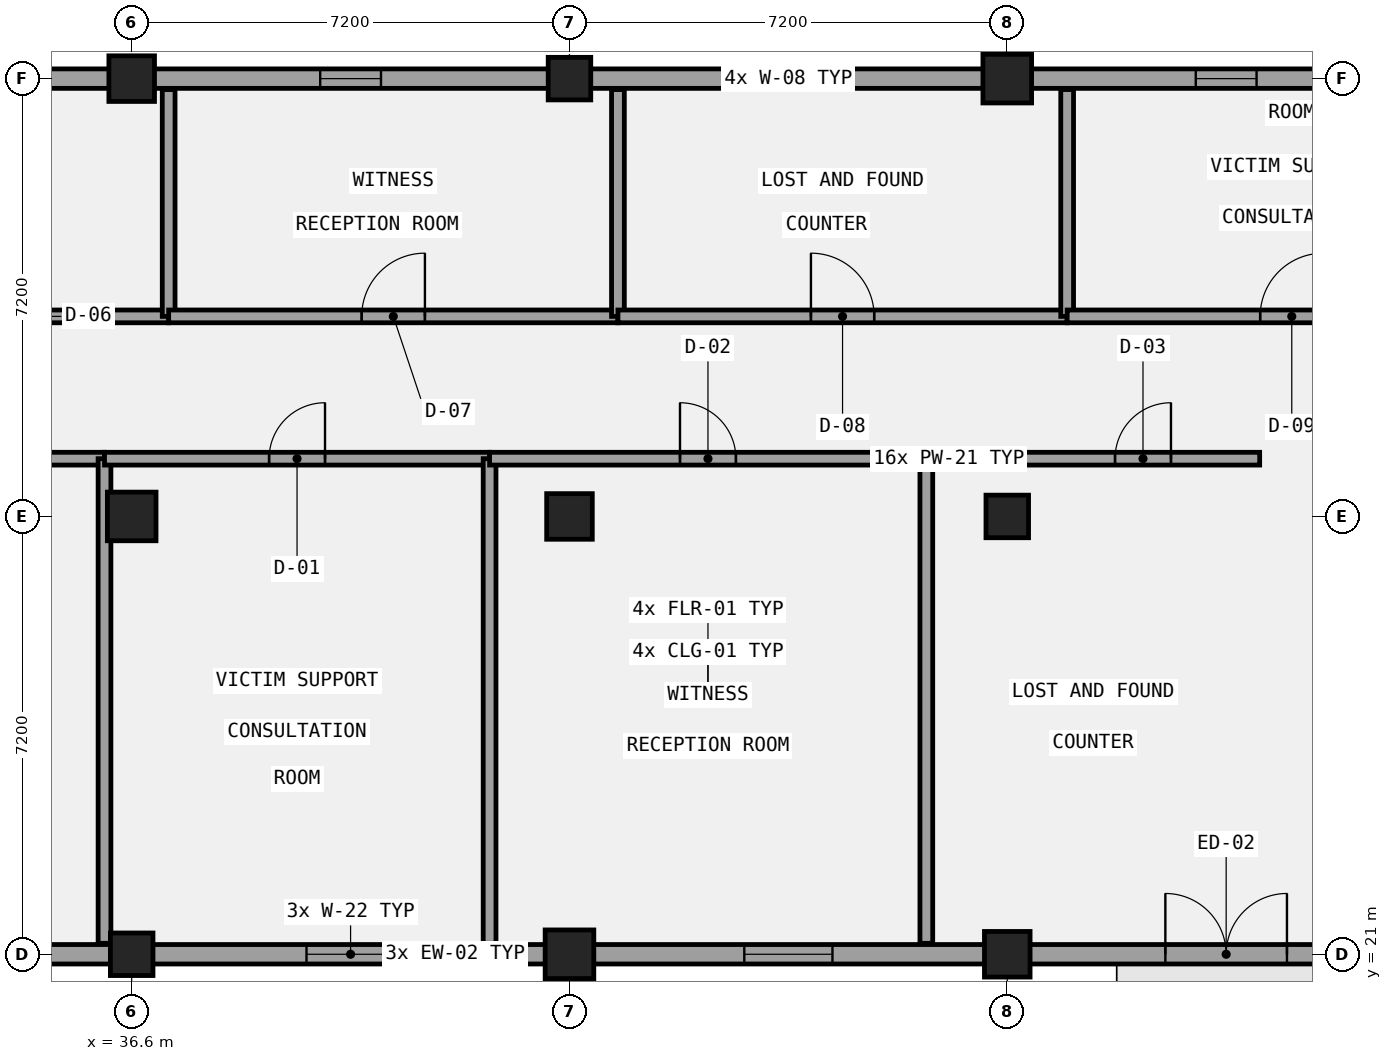
"""IFC4 building model, lengths in metres.
Left out: names, types, materials, properties, quantities, classifications, styles, units other than length and angle.
Written with IfcOpenShell. Run it as: python <this file> out.ifc"""

import sys

from ifc_helpers import new_model, si_unit, direction, frame, frame_2d, origin, origin_2d, place, context, subcontext, project, spatial, rectangle, extrude, element, fill, save


model = new_model("IFC4")
c1 = context("Model", 3, precision=1e-05, world=origin(), true_north=direction((0.0, 1.0)))
c2 = subcontext(c1, "Body", "Model", "MODEL_VIEW")
j1 = project(units=[si_unit("LENGTHUNIT", "METRE"), si_unit("PLANEANGLEUNIT", "RADIAN")], contexts=[c1])
p1 = place(None, origin())
s1 = spatial("IfcSite", under=j1, at=p1, CompositionType="ELEMENT")
p2 = place(p1, origin())
s2 = spatial("IfcBuilding", under=s1, at=p2, CompositionType="ELEMENT")
p3 = place(p2, origin())
s3 = spatial("IfcBuildingStorey", under=s2, at=p3, CompositionType="ELEMENT", Elevation=0.0)
p4 = place(p3, frame((36.6, 21.0, 0.0), z_axis=(0.0, 0.0, 1.0), x_axis=(1.0, 0.0, 0.0)))
e1 = element("IfcColumn", 1, at=p4, inside=s3, PredefinedType="COLUMN", context=c2, shape_type="SweptSolid", body=[
    extrude(rectangle(XDim=0.7, YDim=0.7, at=origin_2d()), origin(), (0.0, 0.0, 1.0), 5.4),
])
p5 = place(p3, frame((36.6, 28.2, 0.0), z_axis=(0.0, 0.0, 1.0), x_axis=(1.0, 0.0, 0.0)))
e2 = element("IfcColumn", 2, at=p5, inside=s3, PredefinedType="COLUMN", context=c2, shape_type="SweptSolid", body=[
    extrude(rectangle(XDim=0.8, YDim=0.8, at=origin_2d()), origin(), (0.0, 0.0, 1.0), 5.4),
])
p6 = place(p3, frame((36.6, 35.4, 0.0), z_axis=(0.0, 0.0, 1.0), x_axis=(1.0, 0.0, 0.0)))
e3 = element("IfcColumn", 3, at=p6, inside=s3, PredefinedType="COLUMN", context=c2, shape_type="SweptSolid", body=[
    extrude(rectangle(XDim=0.75, YDim=0.75, at=origin_2d()), origin(), (0.0, 0.0, 1.0), 5.4),
])
p7 = place(p3, frame((43.8, 21.0, 0.0), z_axis=(0.0, 0.0, 1.0), x_axis=(1.0, 0.0, 0.0)))
e4 = element("IfcColumn", 4, at=p7, inside=s3, PredefinedType="COLUMN", context=c2, shape_type="SweptSolid", body=[
    extrude(rectangle(XDim=0.8, YDim=0.8, at=origin_2d()), origin(), (0.0, 0.0, 1.0), 5.4),
])
p8 = place(p3, frame((43.8, 28.2, 0.0), z_axis=(0.0, 0.0, 1.0), x_axis=(1.0, 0.0, 0.0)))
e5 = element("IfcColumn", 5, at=p8, inside=s3, PredefinedType="COLUMN", context=c2, shape_type="SweptSolid", body=[
    extrude(rectangle(XDim=0.75, YDim=0.75, at=origin_2d()), origin(), (0.0, 0.0, 1.0), 5.4),
])
p9 = place(p3, frame((43.8, 35.4, 0.0), z_axis=(0.0, 0.0, 1.0), x_axis=(1.0, 0.0, 0.0)))
e6 = element("IfcColumn", 6, at=p9, inside=s3, PredefinedType="COLUMN", context=c2, shape_type="SweptSolid", body=[
    extrude(rectangle(XDim=0.7, YDim=0.7, at=origin_2d()), origin(), (0.0, 0.0, 1.0), 5.4),
])
p10 = place(p3, frame((51.0, 21.0, 0.0), z_axis=(0.0, 0.0, 1.0), x_axis=(1.0, 0.0, 0.0)))
e7 = element("IfcColumn", 7, at=p10, inside=s3, PredefinedType="COLUMN", context=c2, shape_type="SweptSolid", body=[
    extrude(rectangle(XDim=0.75, YDim=0.75, at=origin_2d()), origin(), (0.0, 0.0, 1.0), 5.4),
])
p11 = place(p3, frame((51.0, 28.2, 0.0), z_axis=(0.0, 0.0, 1.0), x_axis=(1.0, 0.0, 0.0)))
e8 = element("IfcColumn", 8, at=p11, inside=s3, PredefinedType="COLUMN", context=c2, shape_type="SweptSolid", body=[
    extrude(rectangle(XDim=0.7, YDim=0.7, at=origin_2d()), origin(), (0.0, 0.0, 1.0), 5.4),
])
p12 = place(p3, frame((51.0, 35.4, 0.0), z_axis=(0.0, 0.0, 1.0), x_axis=(1.0, 0.0, 0.0)))
e9 = element("IfcColumn", 9, at=p12, inside=s3, PredefinedType="COLUMN", context=c2, shape_type="SweptSolid", body=[
    extrude(rectangle(XDim=0.8, YDim=0.8, at=origin_2d()), origin(), (0.0, 0.0, 1.0), 5.4),
])
p13 = place(p3, frame((29.24, 21.0, 0.0), z_axis=(0.0, 0.0, 1.0), x_axis=(1.0, 0.0, 0.0)))
e10 = element("IfcWall", 10, at=p13, inside=s3, PredefinedType="SOLIDWALL", context=c2, shape_type="SweptSolid", body=[
    extrude(rectangle(XDim=50.72, YDim=0.32, at=frame_2d((25.36, 0.0))), origin(), (0.0, 0.0, 1.0), 3.35),
])
p14 = place(p13, frame((24.36, 0.0, 0.0)))
e11 = element("IfcOpeningElement", 11, at=p14, cuts=e10, PredefinedType="OPENING", context=c2, shape_type="SweptSolid", body=[
    extrude(rectangle(XDim=2.0, YDim=2.6, at=frame_2d((1.0, 1.3))), frame((0.0, 0.17, 0.0), z_axis=(0.0, -1.0, 0.0), x_axis=(1.0, 0.0, 0.0)), (0.0, 0.0, 1.0), 0.34),
])
p15 = place(p13, frame((3.035, 0.0, 1.0)))
e12 = element("IfcOpeningElement", 12, at=p15, cuts=e10, PredefinedType="OPENING", context=c2, shape_type="SweptSolid", body=[
    extrude(rectangle(XDim=1.45, YDim=1.65, at=frame_2d((0.725, 0.825))), frame((0.0, 0.17, 0.0), z_axis=(0.0, -1.0, 0.0), x_axis=(1.0, 0.0, 0.0)), (0.0, 0.0, 1.0), 0.34),
])
p16 = place(p13, frame((10.235, 0.0, 1.0)))
e13 = element("IfcOpeningElement", 13, at=p16, cuts=e10, PredefinedType="OPENING", context=c2, shape_type="SweptSolid", body=[
    extrude(rectangle(XDim=1.45, YDim=1.65, at=frame_2d((0.725, 0.825))), frame((0.0, 0.17, 0.0), z_axis=(0.0, -1.0, 0.0), x_axis=(1.0, 0.0, 0.0)), (0.0, 0.0, 1.0), 0.34),
])
p17 = place(p13, frame((17.435, 0.0, 1.0)))
e14 = element("IfcOpeningElement", 14, at=p17, cuts=e10, PredefinedType="OPENING", context=c2, shape_type="SweptSolid", body=[
    extrude(rectangle(XDim=1.45, YDim=1.65, at=frame_2d((0.725, 0.825))), frame((0.0, 0.17, 0.0), z_axis=(0.0, -1.0, 0.0), x_axis=(1.0, 0.0, 0.0)), (0.0, 0.0, 1.0), 0.34),
])
p18 = place(p13, frame((31.835, 0.0, 1.0)))
e15 = element("IfcOpeningElement", 15, at=p18, cuts=e10, PredefinedType="OPENING", context=c2, shape_type="SweptSolid", body=[
    extrude(rectangle(XDim=1.45, YDim=1.65, at=frame_2d((0.725, 0.825))), frame((0.0, 0.17, 0.0), z_axis=(0.0, -1.0, 0.0), x_axis=(1.0, 0.0, 0.0)), (0.0, 0.0, 1.0), 0.34),
])
p19 = place(p13, frame((39.035, 0.0, 1.0)))
e16 = element("IfcOpeningElement", 16, at=p19, cuts=e10, PredefinedType="OPENING", context=c2, shape_type="SweptSolid", body=[
    extrude(rectangle(XDim=1.45, YDim=1.65, at=frame_2d((0.725, 0.825))), frame((0.0, 0.17, 0.0), z_axis=(0.0, -1.0, 0.0), x_axis=(1.0, 0.0, 0.0)), (0.0, 0.0, 1.0), 0.34),
])
p20 = place(p13, frame((46.235, 0.0, 1.0)))
e17 = element("IfcOpeningElement", 17, at=p20, cuts=e10, PredefinedType="OPENING", context=c2, shape_type="SweptSolid", body=[
    extrude(rectangle(XDim=1.45, YDim=1.65, at=frame_2d((0.725, 0.825))), frame((0.0, 0.17, 0.0), z_axis=(0.0, -1.0, 0.0), x_axis=(1.0, 0.0, 0.0)), (0.0, 0.0, 1.0), 0.34),
])
p21 = place(p3, frame((72.76, 35.4, 0.0), z_axis=(0.0, 0.0, 1.0), x_axis=(-1.0, 0.0, 0.0)))
e18 = element("IfcWall", 18, at=p21, inside=s3, PredefinedType="SOLIDWALL", context=c2, shape_type="SweptSolid", body=[
    extrude(rectangle(XDim=43.52, YDim=0.32, at=frame_2d((21.76, 0.0))), origin(), (0.0, 0.0, 1.0), 4.12),
])
p22 = place(p21, frame((39.26, 0.0, 1.0)))
e19 = element("IfcOpeningElement", 19, at=p22, cuts=e18, PredefinedType="OPENING", context=c2, shape_type="SweptSolid", body=[
    extrude(rectangle(XDim=1.0, YDim=1.9, at=frame_2d((0.5, 0.95))), frame((0.0, 0.17, 0.0), z_axis=(0.0, -1.0, 0.0), x_axis=(1.0, 0.0, 0.0)), (0.0, 0.0, 1.0), 0.34),
])
p23 = place(p21, frame((32.06, 0.0, 1.0)))
e20 = element("IfcOpeningElement", 20, at=p23, cuts=e18, PredefinedType="OPENING", context=c2, shape_type="SweptSolid", body=[
    extrude(rectangle(XDim=1.0, YDim=1.9, at=frame_2d((0.5, 0.95))), frame((0.0, 0.17, 0.0), z_axis=(0.0, -1.0, 0.0), x_axis=(1.0, 0.0, 0.0)), (0.0, 0.0, 1.0), 0.34),
])
p24 = place(p21, frame((24.86, 0.0, 1.0)))
e21 = element("IfcOpeningElement", 21, at=p24, cuts=e18, PredefinedType="OPENING", context=c2, shape_type="SweptSolid", body=[
    extrude(rectangle(XDim=1.0, YDim=1.9, at=frame_2d((0.5, 0.95))), frame((0.0, 0.17, 0.0), z_axis=(0.0, -1.0, 0.0), x_axis=(1.0, 0.0, 0.0)), (0.0, 0.0, 1.0), 0.34),
])
p25 = place(p21, frame((17.66, 0.0, 1.0)))
e22 = element("IfcOpeningElement", 22, at=p25, cuts=e18, PredefinedType="OPENING", context=c2, shape_type="SweptSolid", body=[
    extrude(rectangle(XDim=1.0, YDim=1.9, at=frame_2d((0.5, 0.95))), frame((0.0, 0.17, 0.0), z_axis=(0.0, -1.0, 0.0), x_axis=(1.0, 0.0, 0.0)), (0.0, 0.0, 1.0), 0.34),
])
p26 = place(p21, frame((10.46, 0.0, 1.0)))
e23 = element("IfcOpeningElement", 23, at=p26, cuts=e18, PredefinedType="OPENING", context=c2, shape_type="SweptSolid", body=[
    extrude(rectangle(XDim=1.0, YDim=1.9, at=frame_2d((0.5, 0.95))), frame((0.0, 0.17, 0.0), z_axis=(0.0, -1.0, 0.0), x_axis=(1.0, 0.0, 0.0)), (0.0, 0.0, 1.0), 0.34),
])
p27 = place(p21, frame((3.26, 0.0, 1.0)))
e24 = element("IfcOpeningElement", 24, at=p27, cuts=e18, PredefinedType="OPENING", context=c2, shape_type="SweptSolid", body=[
    extrude(rectangle(XDim=1.0, YDim=1.9, at=frame_2d((0.5, 0.95))), frame((0.0, 0.17, 0.0), z_axis=(0.0, -1.0, 0.0), x_axis=(1.0, 0.0, 0.0)), (0.0, 0.0, 1.0), 0.34),
])
p28 = place(p3, frame((29.82, 29.15, 0.0), z_axis=(0.0, 0.0, 1.0), x_axis=(1.0, 0.0, 0.0)))
e25 = element("IfcWall", 25, at=p28, inside=s3, PredefinedType="PARTITIONING", context=c2, shape_type="SweptSolid", body=[
    extrude(rectangle(XDim=6.333, YDim=0.21, at=frame_2d((3.167, 0.0))), origin(), (0.0, 0.0, 1.0), 5.12),
])
p29 = place(p28, frame((2.306, 0.0, 0.0)))
e26 = element("IfcOpeningElement", 26, at=p29, cuts=e25, PredefinedType="OPENING", context=c2, shape_type="SweptSolid", body=[
    extrude(rectangle(XDim=1.72, YDim=2.35, at=frame_2d((0.86, 1.175))), frame((0.0, 0.115, 0.0), z_axis=(0.0, -1.0, 0.0), x_axis=(1.0, 0.0, 0.0)), (0.0, 0.0, 1.0), 0.23),
])
p30 = place(p3, frame((36.153, 21.18, 0.0), z_axis=(0.0, 0.0, 1.0), x_axis=(0.0, 1.0, 0.0)))
e27 = element("IfcWall", 27, at=p30, inside=s3, PredefinedType="PARTITIONING", context=c2, shape_type="SweptSolid", body=[
    extrude(rectangle(XDim=7.97, YDim=0.21, at=frame_2d((3.985, 0.0))), origin(), (0.0, 0.0, 1.0), 5.12),
])
p31 = place(p3, frame((36.153, 29.15, 0.0), z_axis=(0.0, 0.0, 1.0), x_axis=(1.0, 0.0, 0.0)))
e28 = element("IfcWall", 28, at=p31, inside=s3, PredefinedType="PARTITIONING", context=c2, shape_type="SweptSolid", body=[
    extrude(rectangle(XDim=6.333, YDim=0.21, at=frame_2d((3.167, 0.0))), origin(), (0.0, 0.0, 1.0), 5.12),
])
p32 = place(p31, frame((2.707, 0.0, 0.0)))
e29 = element("IfcOpeningElement", 29, at=p32, cuts=e28, PredefinedType="OPENING", context=c2, shape_type="SweptSolid", body=[
    extrude(rectangle(XDim=0.92, YDim=2.1, at=frame_2d((0.46, 1.05))), frame((0.0, 0.115, 0.0), z_axis=(0.0, -1.0, 0.0), x_axis=(1.0, 0.0, 0.0)), (0.0, 0.0, 1.0), 0.23),
])
p33 = place(p3, frame((42.486, 21.18, 0.0), z_axis=(0.0, 0.0, 1.0), x_axis=(0.0, 1.0, 0.0)))
e30 = element("IfcWall", 30, at=p33, inside=s3, PredefinedType="PARTITIONING", context=c2, shape_type="SweptSolid", body=[
    extrude(rectangle(XDim=7.97, YDim=0.21, at=frame_2d((3.985, 0.0))), origin(), (0.0, 0.0, 1.0), 5.12),
])
p34 = place(p3, frame((42.486, 29.15, 0.0), z_axis=(0.0, 0.0, 1.0), x_axis=(1.0, 0.0, 0.0)))
e31 = element("IfcWall", 31, at=p34, inside=s3, PredefinedType="PARTITIONING", context=c2, shape_type="SweptSolid", body=[
    extrude(rectangle(XDim=7.183, YDim=0.21, at=frame_2d((3.591, 0.0))), origin(), (0.0, 0.0, 1.0), 5.12),
])
p35 = place(p34, frame((3.132, 0.0, 0.0)))
e32 = element("IfcOpeningElement", 32, at=p35, cuts=e31, PredefinedType="OPENING", context=c2, shape_type="SweptSolid", body=[
    extrude(rectangle(XDim=0.92, YDim=2.22, at=frame_2d((0.46, 1.11))), frame((0.0, 0.115, 0.0), z_axis=(0.0, -1.0, 0.0), x_axis=(1.0, 0.0, 0.0)), (0.0, 0.0, 1.0), 0.23),
])
p36 = place(p3, frame((49.669, 21.18, 0.0), z_axis=(0.0, 0.0, 1.0), x_axis=(0.0, 1.0, 0.0)))
e33 = element("IfcWall", 33, at=p36, inside=s3, PredefinedType="PARTITIONING", context=c2, shape_type="SweptSolid", body=[
    extrude(rectangle(XDim=7.97, YDim=0.21, at=frame_2d((3.985, 0.0))), origin(), (0.0, 0.0, 1.0), 5.12),
])
p37 = place(p3, frame((49.669, 29.15, 0.0), z_axis=(0.0, 0.0, 1.0), x_axis=(1.0, 0.0, 0.0)))
e34 = element("IfcWall", 34, at=p37, inside=s3, PredefinedType="PARTITIONING", context=c2, shape_type="SweptSolid", body=[
    extrude(rectangle(XDim=5.482, YDim=0.21, at=frame_2d((2.741, 0.0))), origin(), (0.0, 0.0, 1.0), 5.12),
])
p38 = place(p37, frame((3.103, 0.0, 0.0)))
e35 = element("IfcOpeningElement", 35, at=p38, cuts=e34, PredefinedType="OPENING", context=c2, shape_type="SweptSolid", body=[
    extrude(rectangle(XDim=0.92, YDim=2.35, at=frame_2d((0.46, 1.175))), frame((0.0, 0.115, 0.0), z_axis=(0.0, -1.0, 0.0), x_axis=(1.0, 0.0, 0.0)), (0.0, 0.0, 1.0), 0.23),
])
p39 = place(p3, frame((29.82, 31.49, 0.0), z_axis=(0.0, 0.0, 1.0), x_axis=(1.0, 0.0, 0.0)))
e36 = element("IfcWall", 36, at=p39, inside=s3, PredefinedType="PARTITIONING", context=c2, shape_type="SweptSolid", body=[
    extrude(rectangle(XDim=7.388, YDim=0.21, at=frame_2d((3.694, 0.0))), origin(), (0.0, 0.0, 1.0), 5.12),
])
p40 = place(p39, frame((3.204, 0.0, 0.0)))
e37 = element("IfcOpeningElement", 37, at=p40, cuts=e36, PredefinedType="OPENING", context=c2, shape_type="SweptSolid", body=[
    extrude(rectangle(XDim=0.98, YDim=2.35, at=frame_2d((0.49, 1.175))), frame((0.0, 0.115, 0.0), z_axis=(0.0, -1.0, 0.0), x_axis=(1.0, 0.0, 0.0)), (0.0, 0.0, 1.0), 0.23),
])
p41 = place(p3, frame((37.208, 31.49, 0.0), z_axis=(0.0, 0.0, 1.0), x_axis=(0.0, 1.0, 0.0)))
e38 = element("IfcWall", 38, at=p41, inside=s3, PredefinedType="PARTITIONING", context=c2, shape_type="SweptSolid", body=[
    extrude(rectangle(XDim=3.73, YDim=0.21, at=frame_2d((1.865, 0.0))), origin(), (0.0, 0.0, 1.0), 5.12),
])
p42 = place(p3, frame((37.208, 31.49, 0.0), z_axis=(0.0, 0.0, 1.0), x_axis=(1.0, 0.0, 0.0)))
e39 = element("IfcWall", 39, at=p42, inside=s3, PredefinedType="PARTITIONING", context=c2, shape_type="SweptSolid", body=[
    extrude(rectangle(XDim=7.389, YDim=0.21, at=frame_2d((3.694, 0.0))), origin(), (0.0, 0.0, 1.0), 5.12),
])
p43 = place(p42, frame((3.175, 0.0, 0.0)))
e40 = element("IfcOpeningElement", 40, at=p43, cuts=e39, PredefinedType="OPENING", context=c2, shape_type="SweptSolid", body=[
    extrude(rectangle(XDim=1.04, YDim=2.1, at=frame_2d((0.52, 1.05))), frame((0.0, 0.115, 0.0), z_axis=(0.0, -1.0, 0.0), x_axis=(1.0, 0.0, 0.0)), (0.0, 0.0, 1.0), 0.23),
])
p44 = place(p3, frame((44.597, 31.49, 0.0), z_axis=(0.0, 0.0, 1.0), x_axis=(0.0, 1.0, 0.0)))
e41 = element("IfcWall", 41, at=p44, inside=s3, PredefinedType="PARTITIONING", context=c2, shape_type="SweptSolid", body=[
    extrude(rectangle(XDim=3.73, YDim=0.21, at=frame_2d((1.865, 0.0))), origin(), (0.0, 0.0, 1.0), 5.12),
])
p45 = place(p3, frame((44.597, 31.49, 0.0), z_axis=(0.0, 0.0, 1.0), x_axis=(1.0, 0.0, 0.0)))
e42 = element("IfcWall", 42, at=p45, inside=s3, PredefinedType="PARTITIONING", context=c2, shape_type="SweptSolid", body=[
    extrude(rectangle(XDim=7.388, YDim=0.21, at=frame_2d((3.694, 0.0))), origin(), (0.0, 0.0, 1.0), 5.12),
])
p46 = place(p45, frame((3.174, 0.0, 0.0)))
e43 = element("IfcOpeningElement", 43, at=p46, cuts=e42, PredefinedType="OPENING", context=c2, shape_type="SweptSolid", body=[
    extrude(rectangle(XDim=1.04, YDim=2.22, at=frame_2d((0.52, 1.11))), frame((0.0, 0.115, 0.0), z_axis=(0.0, -1.0, 0.0), x_axis=(1.0, 0.0, 0.0)), (0.0, 0.0, 1.0), 0.23),
])
p47 = place(p3, frame((51.985, 31.49, 0.0), z_axis=(0.0, 0.0, 1.0), x_axis=(0.0, 1.0, 0.0)))
e44 = element("IfcWall", 44, at=p47, inside=s3, PredefinedType="PARTITIONING", context=c2, shape_type="SweptSolid", body=[
    extrude(rectangle(XDim=3.73, YDim=0.21, at=frame_2d((1.865, 0.0))), origin(), (0.0, 0.0, 1.0), 5.12),
])
p48 = place(p3, frame((51.985, 31.49, 0.0), z_axis=(0.0, 0.0, 1.0), x_axis=(1.0, 0.0, 0.0)))
e45 = element("IfcWall", 45, at=p48, inside=s3, PredefinedType="PARTITIONING", context=c2, shape_type="SweptSolid", body=[
    extrude(rectangle(XDim=7.388, YDim=0.21, at=frame_2d((3.694, 0.0))), origin(), (0.0, 0.0, 1.0), 5.12),
])
p49 = place(p48, frame((3.174, 0.0, 0.0)))
e46 = element("IfcOpeningElement", 46, at=p49, cuts=e45, PredefinedType="OPENING", context=c2, shape_type="SweptSolid", body=[
    extrude(rectangle(XDim=1.04, YDim=2.35, at=frame_2d((0.52, 1.175))), frame((0.0, 0.115, 0.0), z_axis=(0.0, -1.0, 0.0), x_axis=(1.0, 0.0, 0.0)), (0.0, 0.0, 1.0), 0.23),
])
p50 = place(p14, frame((2.0, 0.0, 0.0), z_axis=(0.0, 0.0, 1.0), x_axis=(-1.0, 0.0, 0.0)))
e47 = element("IfcDoor", 47, at=p50, inside=s3, OperationType="DOUBLE_DOOR_SINGLE_SWING", PredefinedType="DOOR", context=c2, shape_type="SweptSolid", body=[
    extrude(rectangle(XDim=2.0, YDim=2.6, at=frame_2d((1.0, 1.3))), frame((0.0, 0.025, 0.0), z_axis=(0.0, -1.0, 0.0), x_axis=(1.0, 0.0, 0.0)), (0.0, 0.0, 1.0), 0.05),
])
fill(e11, e47)
p51 = place(p16, origin())
e48 = element("IfcWindow", 48, at=p51, inside=s3, PartitioningType="SINGLE_PANEL", PredefinedType="WINDOW", context=c2, shape_type="SweptSolid", body=[
    extrude(rectangle(XDim=1.45, YDim=1.65, at=frame_2d((0.725, 0.825))), frame((0.0, 0.03, 0.0), z_axis=(0.0, -1.0, 0.0), x_axis=(1.0, 0.0, 0.0)), (0.0, 0.0, 1.0), 0.06),
])
fill(e13, e48)
p52 = place(p17, origin())
e49 = element("IfcWindow", 49, at=p52, inside=s3, PartitioningType="SINGLE_PANEL", PredefinedType="WINDOW", context=c2, shape_type="SweptSolid", body=[
    extrude(rectangle(XDim=1.45, YDim=1.65, at=frame_2d((0.725, 0.825))), frame((0.0, 0.03, 0.0), z_axis=(0.0, -1.0, 0.0), x_axis=(1.0, 0.0, 0.0)), (0.0, 0.0, 1.0), 0.06),
])
fill(e14, e49)
p53 = place(p23, origin())
e50 = element("IfcWindow", 50, at=p53, inside=s3, PartitioningType="SINGLE_PANEL", PredefinedType="WINDOW", context=c2, shape_type="SweptSolid", body=[
    extrude(rectangle(XDim=1.0, YDim=1.9, at=frame_2d((0.5, 0.95))), frame((0.0, 0.03, 0.0), z_axis=(0.0, -1.0, 0.0), x_axis=(1.0, 0.0, 0.0)), (0.0, 0.0, 1.0), 0.06),
])
fill(e20, e50)
p54 = place(p24, origin())
e51 = element("IfcWindow", 51, at=p54, inside=s3, PartitioningType="SINGLE_PANEL", PredefinedType="WINDOW", context=c2, shape_type="SweptSolid", body=[
    extrude(rectangle(XDim=1.0, YDim=1.9, at=frame_2d((0.5, 0.95))), frame((0.0, 0.03, 0.0), z_axis=(0.0, -1.0, 0.0), x_axis=(1.0, 0.0, 0.0)), (0.0, 0.0, 1.0), 0.06),
])
fill(e21, e51)
p55 = place(p25, origin())
e52 = element("IfcWindow", 52, at=p55, inside=s3, PartitioningType="SINGLE_PANEL", PredefinedType="WINDOW", context=c2, shape_type="SweptSolid", body=[
    extrude(rectangle(XDim=1.0, YDim=1.9, at=frame_2d((0.5, 0.95))), frame((0.0, 0.03, 0.0), z_axis=(0.0, -1.0, 0.0), x_axis=(1.0, 0.0, 0.0)), (0.0, 0.0, 1.0), 0.06),
])
fill(e22, e52)
p56 = place(p32, frame((0.92, 0.0, 0.0), z_axis=(0.0, 0.0, 1.0), x_axis=(-1.0, 0.0, 0.0)))
e53 = element("IfcDoor", 53, at=p56, inside=s3, OperationType="SINGLE_SWING_RIGHT", PredefinedType="DOOR", context=c2, shape_type="SweptSolid", body=[
    extrude(rectangle(XDim=0.92, YDim=2.1, at=frame_2d((0.46, 1.05))), frame((0.0, 0.025, 0.0), z_axis=(0.0, -1.0, 0.0), x_axis=(1.0, 0.0, 0.0)), (0.0, 0.0, 1.0), 0.05),
])
fill(e29, e53)
p57 = place(p35, frame((0.92, 0.0, 0.0), z_axis=(0.0, 0.0, 1.0), x_axis=(-1.0, 0.0, 0.0)))
e54 = element("IfcDoor", 54, at=p57, inside=s3, OperationType="SINGLE_SWING_LEFT", PredefinedType="DOOR", context=c2, shape_type="SweptSolid", body=[
    extrude(rectangle(XDim=0.92, YDim=2.22, at=frame_2d((0.46, 1.11))), frame((0.0, 0.025, 0.0), z_axis=(0.0, -1.0, 0.0), x_axis=(1.0, 0.0, 0.0)), (0.0, 0.0, 1.0), 0.05),
])
fill(e32, e54)
p58 = place(p38, frame((0.92, 0.0, 0.0), z_axis=(0.0, 0.0, 1.0), x_axis=(-1.0, 0.0, 0.0)))
e55 = element("IfcDoor", 55, at=p58, inside=s3, OperationType="SINGLE_SWING_RIGHT", PredefinedType="DOOR", context=c2, shape_type="SweptSolid", body=[
    extrude(rectangle(XDim=0.92, YDim=2.35, at=frame_2d((0.46, 1.175))), frame((0.0, 0.025, 0.0), z_axis=(0.0, -1.0, 0.0), x_axis=(1.0, 0.0, 0.0)), (0.0, 0.0, 1.0), 0.05),
])
fill(e35, e55)
p59 = place(p43, origin())
e56 = element("IfcDoor", 56, at=p59, inside=s3, OperationType="SINGLE_SWING_RIGHT", PredefinedType="DOOR", context=c2, shape_type="SweptSolid", body=[
    extrude(rectangle(XDim=1.04, YDim=2.1, at=frame_2d((0.52, 1.05))), frame((0.0, 0.025, 0.0), z_axis=(0.0, -1.0, 0.0), x_axis=(1.0, 0.0, 0.0)), (0.0, 0.0, 1.0), 0.05),
])
fill(e40, e56)
p60 = place(p46, origin())
e57 = element("IfcDoor", 57, at=p60, inside=s3, OperationType="SINGLE_SWING_LEFT", PredefinedType="DOOR", context=c2, shape_type="SweptSolid", body=[
    extrude(rectangle(XDim=1.04, YDim=2.22, at=frame_2d((0.52, 1.11))), frame((0.0, 0.025, 0.0), z_axis=(0.0, -1.0, 0.0), x_axis=(1.0, 0.0, 0.0)), (0.0, 0.0, 1.0), 0.05),
])
fill(e43, e57)
p61 = place(p49, origin())
e58 = element("IfcDoor", 58, at=p61, inside=s3, OperationType="SINGLE_SWING_RIGHT", PredefinedType="DOOR", context=c2, shape_type="SweptSolid", body=[
    extrude(rectangle(XDim=1.04, YDim=2.35, at=frame_2d((0.52, 1.175))), frame((0.0, 0.025, 0.0), z_axis=(0.0, -1.0, 0.0), x_axis=(1.0, 0.0, 0.0)), (0.0, 0.0, 1.0), 0.05),
])
fill(e46, e58)
save(model, sys.argv[1])
